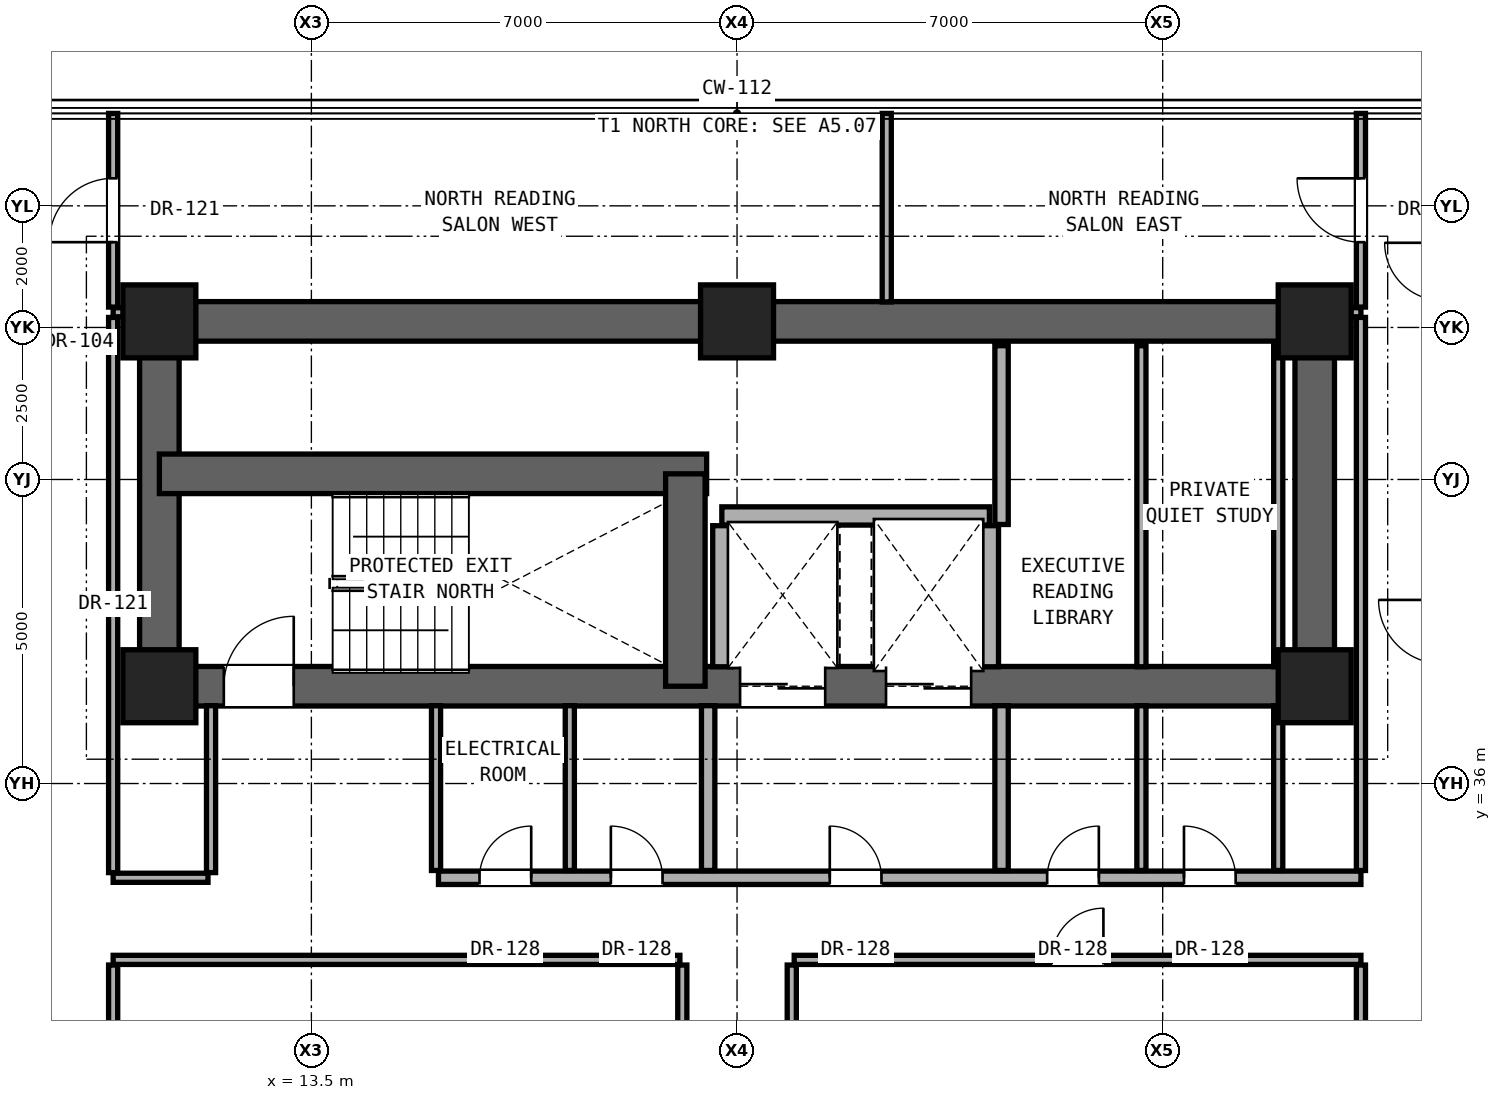
"""IFC4 building model, lengths in metres.
Left out: names, types, materials, properties, quantities, classifications, styles, units other than length and angle.
Written with IfcOpenShell. Run it as: python <this file> out.ifc"""

import sys

from ifc_helpers import new_model, si_unit, direction, frame, frame_2d, origin, origin_2d, place, context, subcontext, project, spatial, rectangle, extrude, element, fill, save


model = new_model("IFC4")
c1 = context("Model", 3, precision=1e-05, world=origin(), true_north=direction((0.0, 1.0)))
c2 = subcontext(c1, "Body", "Model", "MODEL_VIEW")
j1 = project(units=[si_unit("LENGTHUNIT", "METRE"), si_unit("PLANEANGLEUNIT", "RADIAN")], contexts=[c1])
p1 = place(None, origin())
s1 = spatial("IfcSite", under=j1, at=p1, CompositionType="ELEMENT")
p2 = place(p1, origin())
s2 = spatial("IfcBuilding", under=s1, at=p2, CompositionType="ELEMENT")
p3 = place(p2, frame((0.0, 0.0, 104.9)))
s3 = spatial("IfcBuildingStorey", under=s2, at=p3, CompositionType="ELEMENT", Elevation=104.9)
for number, where, z_axis, x_axis in (
    (1, (11.0, 37.6, 0.0), (0.0, 0.0, 1.0), (1.0, 0.0, 0.0)),
    (2, (30.0, 37.6, 0.0), (0.0, 0.0, 1.0), (1.0, 0.0, 0.0)),
    (3, (11.0, 43.6, 0.0), (0.0, 0.0, 1.0), (1.0, 0.0, 0.0)),
    (4, (20.5, 43.6, 0.0), (0.0, 0.0, 1.0), (1.0, 0.0, 0.0)),
    (5, (30.0, 43.6, 0.0), (0.0, 0.0, 1.0), (1.0, 0.0, 0.0)),
):
    element("IfcColumn", number, at=place(p3, frame(where, z_axis=z_axis, x_axis=x_axis)), inside=s3, PredefinedType="COLUMN", context=c2, shape_type="SweptSolid", body=[
        extrude(rectangle(XDim=1.2, YDim=1.2, at=origin_2d()), origin(), (0.0, 0.0, 1.0), 3.3),
    ])
p4 = place(p3, frame((11.0, 43.6, 0.0), z_axis=(0.0, 0.0, 1.0), x_axis=(1.0, 0.0, 0.0)))
e6 = element("IfcWall", 6, at=p4, inside=s3, PredefinedType="SHEAR", context=c2, shape_type="SweptSolid", body=[
    extrude(rectangle(XDim=19.0, YDim=0.65, at=frame_2d((9.5, 0.0))), origin(), (0.0, 0.0, 1.0), 3.08),
])
for number, where, z_axis, x_axis in (
    (7, (11.0, 37.6, 0.0), (0.0, 0.0, 1.0), (0.0, 1.0, 0.0)),
    (8, (30.0, 37.6, 0.0), (0.0, 0.0, 1.0), (0.0, 1.0, 0.0)),
):
    element("IfcWall", number, at=place(p3, frame(where, z_axis=z_axis, x_axis=x_axis)), inside=s3, PredefinedType="SHEAR", context=c2, shape_type="SweptSolid", body=[
        extrude(rectangle(XDim=6.0, YDim=0.65, at=frame_2d((3.0, 0.0))), origin(), (0.0, 0.0, 1.0), 3.08),
    ])
p5 = place(p3, frame((11.0, 37.6, 0.0), z_axis=(0.0, 0.0, 1.0), x_axis=(1.0, 0.0, 0.0)))
e9 = element("IfcWall", 9, at=p5, inside=s3, PredefinedType="SHEAR", context=c2, shape_type="SweptSolid", body=[
    extrude(rectangle(XDim=19.0, YDim=0.65, at=frame_2d((9.5, 0.0))), origin(), (0.0, 0.0, 1.0), 3.08),
])
p6 = place(p5, frame((1.06, 0.0, 0.0)))
e10 = element("IfcOpeningElement", 10, at=p6, cuts=e9, PredefinedType="OPENING", context=c2, shape_type="SweptSolid", body=[
    extrude(rectangle(XDim=1.15, YDim=2.2, at=frame_2d((0.575, 1.1))), frame((0.0, 0.335, 0.0), z_axis=(0.0, -1.0, 0.0), x_axis=(1.0, 0.0, 0.0)), (0.0, 0.0, 1.0), 0.67),
])
p7 = place(p5, frame((9.55, 0.0, 0.0)))
e11 = element("IfcOpeningElement", 11, at=p7, cuts=e9, PredefinedType="OPENING", context=c2, shape_type="SweptSolid", body=[
    extrude(rectangle(XDim=1.4, YDim=2.35, at=frame_2d((0.7, 1.175))), frame((0.0, 0.335, 0.0), z_axis=(0.0, -1.0, 0.0), x_axis=(1.0, 0.0, 0.0)), (0.0, 0.0, 1.0), 0.67),
])
p8 = place(p5, frame((11.95, 0.0, 0.0)))
e12 = element("IfcOpeningElement", 12, at=p8, cuts=e9, PredefinedType="OPENING", context=c2, shape_type="SweptSolid", body=[
    extrude(rectangle(XDim=1.4, YDim=2.35, at=frame_2d((0.7, 1.175))), frame((0.0, 0.335, 0.0), z_axis=(0.0, -1.0, 0.0), x_axis=(1.0, 0.0, 0.0)), (0.0, 0.0, 1.0), 0.67),
])
p9 = place(p3, frame((11.0, 41.093, 0.0), z_axis=(0.0, 0.0, 1.0), x_axis=(1.0, 0.0, 0.0)))
e13 = element("IfcWall", 13, at=p9, inside=s3, PredefinedType="SHEAR", context=c2, shape_type="SweptSolid", body=[
    extrude(rectangle(XDim=9.0, YDim=0.65, at=frame_2d((4.5, 0.0))), origin(), (0.0, 0.0, 1.0), 3.08),
])
p10 = place(p3, frame((19.65, 37.6, 0.0), z_axis=(0.0, 0.0, 1.0), x_axis=(0.0, 1.0, 0.0)))
e14 = element("IfcWall", 14, at=p10, inside=s3, PredefinedType="SHEAR", context=c2, shape_type="SweptSolid", body=[
    extrude(rectangle(XDim=3.493, YDim=0.65, at=frame_2d((1.747, 0.0))), origin(), (0.0, 0.0, 1.0), 3.08),
])
p11 = place(p3, frame((10.24, 33.1, 0.0), z_axis=(0.0, 0.0, 1.0), x_axis=(1.0, 0.0, 0.0)))
e15 = element("IfcWall", 15, at=p11, inside=s3, PredefinedType="PARTITIONING", context=c2, shape_type="SweptSolid", body=[
    extrude(rectangle(XDim=9.32, YDim=0.15, at=frame_2d((4.66, 0.0))), origin(), (0.0, 0.0, 1.0), 2.124),
])
p12 = place(p3, frame((21.44, 33.1, 0.0), z_axis=(0.0, 0.0, 1.0), x_axis=(1.0, 0.0, 0.0)))
e16 = element("IfcWall", 16, at=p12, inside=s3, PredefinedType="PARTITIONING", context=c2, shape_type="SweptSolid", body=[
    extrude(rectangle(XDim=9.32, YDim=0.15, at=frame_2d((4.66, 0.0))), origin(), (0.0, 0.0, 1.0), 2.124),
])
p13 = place(p12, frame((4.235, 0.0, 0.0)))
e17 = element("IfcOpeningElement", 17, at=p13, cuts=e16, PredefinedType="OPENING", context=c2, shape_type="SweptSolid", body=[
    extrude(rectangle(XDim=0.85, YDim=2.01, at=frame_2d((0.425, 1.005))), frame((0.0, 0.085, 0.0), z_axis=(0.0, -1.0, 0.0), x_axis=(1.0, 0.0, 0.0)), (0.0, 0.0, 1.0), 0.17),
])
p14 = place(p3, frame((10.24, 34.45, 0.0), z_axis=(0.0, 0.0, 1.0), x_axis=(1.0, 0.0, 0.0)))
e18 = element("IfcWall", 18, at=p14, inside=s3, PredefinedType="PARTITIONING", context=c2, shape_type="SweptSolid", body=[
    extrude(rectangle(XDim=1.56, YDim=0.15, at=frame_2d((0.78, 0.0))), origin(), (0.0, 0.0, 1.0), 2.124),
])
p15 = place(p3, frame((15.59, 34.45, 0.0), z_axis=(0.0, 0.0, 1.0), x_axis=(1.0, 0.0, 0.0)))
e19 = element("IfcWall", 19, at=p15, inside=s3, PredefinedType="SOLIDWALL", context=c2, shape_type="SweptSolid", body=[
    extrude(rectangle(XDim=15.17, YDim=0.22, at=frame_2d((7.585, 0.0))), origin(), (0.0, 0.0, 1.0), 2.124),
])
p16 = place(p15, frame((6.435, 0.0, 0.0)))
e20 = element("IfcOpeningElement", 20, at=p16, cuts=e19, PredefinedType="OPENING", context=c2, shape_type="SweptSolid", body=[
    extrude(rectangle(XDim=0.85, YDim=2.01, at=frame_2d((0.425, 1.005))), frame((0.0, 0.12, 0.0), z_axis=(0.0, -1.0, 0.0), x_axis=(1.0, 0.0, 0.0)), (0.0, 0.0, 1.0), 0.24),
])
p17 = place(p15, frame((10.01, 0.0, 0.0)))
e21 = element("IfcOpeningElement", 21, at=p17, cuts=e19, PredefinedType="OPENING", context=c2, shape_type="SweptSolid", body=[
    extrude(rectangle(XDim=0.85, YDim=2.01, at=frame_2d((0.425, 1.005))), frame((0.0, 0.12, 0.0), z_axis=(0.0, -1.0, 0.0), x_axis=(1.0, 0.0, 0.0)), (0.0, 0.0, 1.0), 0.24),
])
p18 = place(p15, frame((12.26, 0.0, 0.0)))
e22 = element("IfcOpeningElement", 22, at=p18, cuts=e19, PredefinedType="OPENING", context=c2, shape_type="SweptSolid", body=[
    extrude(rectangle(XDim=0.85, YDim=2.01, at=frame_2d((0.425, 1.005))), frame((0.0, 0.12, 0.0), z_axis=(0.0, -1.0, 0.0), x_axis=(1.0, 0.0, 0.0)), (0.0, 0.0, 1.0), 0.24),
])
p19 = place(p15, frame((0.675, 0.0, 0.0)))
e23 = element("IfcOpeningElement", 23, at=p19, cuts=e19, PredefinedType="OPENING", context=c2, shape_type="SweptSolid", body=[
    extrude(rectangle(XDim=0.85, YDim=2.01, at=frame_2d((0.425, 1.005))), frame((0.0, 0.12, 0.0), z_axis=(0.0, -1.0, 0.0), x_axis=(1.0, 0.0, 0.0)), (0.0, 0.0, 1.0), 0.24),
])
p20 = place(p15, frame((2.835, 0.0, 0.0)))
e24 = element("IfcOpeningElement", 24, at=p20, cuts=e19, PredefinedType="OPENING", context=c2, shape_type="SweptSolid", body=[
    extrude(rectangle(XDim=0.85, YDim=2.01, at=frame_2d((0.425, 1.005))), frame((0.0, 0.12, 0.0), z_axis=(0.0, -1.0, 0.0), x_axis=(1.0, 0.0, 0.0)), (0.0, 0.0, 1.0), 0.24),
])
p21 = place(p3, frame((20.25, 40.4, 0.0), z_axis=(0.0, 0.0, 1.0), x_axis=(1.0, 0.0, 0.0)))
e25 = element("IfcWall", 25, at=p21, inside=s3, PredefinedType="SOLIDWALL", context=c2, shape_type="SweptSolid", body=[
    extrude(rectangle(XDim=4.4, YDim=0.3, at=frame_2d((2.2, 0.0))), origin(), (0.0, 0.0, 1.0), 3.08),
])
for number, where, z_axis, x_axis in (
    (26, (10.24, 43.75, 0.0), (0.0, 0.0, 1.0), (1.0, 0.0, 0.0)),
    (27, (30.32, 43.75, 0.0), (0.0, 0.0, 1.0), (1.0, 0.0, 0.0)),
):
    element("IfcWall", number, at=place(p3, frame(where, z_axis=z_axis, x_axis=x_axis)), inside=s3, PredefinedType="PARTITIONING", context=c2, shape_type="SweptSolid", body=[
        extrude(rectangle(XDim=0.44, YDim=0.15, at=frame_2d((0.22, 0.0))), origin(), (0.0, 0.0, 1.0), 3.08),
    ])
p22 = place(p3, frame((10.24, 27.485, 0.0), z_axis=(0.0, 0.0, 1.0), x_axis=(0.0, 1.0, 0.0)))
e28 = element("IfcWall", 28, at=p22, inside=s3, PredefinedType="PARTITIONING", context=c2, shape_type="SweptSolid", body=[
    extrude(rectangle(XDim=5.53, YDim=0.15, at=frame_2d((2.765, 0.0))), origin(), (0.0, 0.0, 1.0), 2.299),
])
p23 = place(p22, frame((2.29, 0.0, 0.0)))
e29 = element("IfcOpeningElement", 29, at=p23, cuts=e28, PredefinedType="OPENING", context=c2, shape_type="SweptSolid", body=[
    extrude(rectangle(XDim=0.95, YDim=2.15, at=frame_2d((0.475, 1.075))), frame((0.0, 0.085, 0.0), z_axis=(0.0, -1.0, 0.0), x_axis=(1.0, 0.0, 0.0)), (0.0, 0.0, 1.0), 0.17),
])
p24 = place(p3, frame((10.24, 34.535, 0.0), z_axis=(0.0, 0.0, 1.0), x_axis=(0.0, 1.0, 0.0)))
e30 = element("IfcWall", 30, at=p24, inside=s3, PredefinedType="PARTITIONING", context=c2, shape_type="SweptSolid", body=[
    extrude(rectangle(XDim=9.13, YDim=0.15, at=frame_2d((4.565, 0.0))), origin(), (0.0, 0.0, 1.0), 2.456),
])
p25 = place(p3, frame((10.24, 43.835, 0.0), z_axis=(0.0, 0.0, 1.0), x_axis=(0.0, 1.0, 0.0)))
e31 = element("IfcWall", 31, at=p25, inside=s3, PredefinedType="PARTITIONING", context=c2, shape_type="SweptSolid", body=[
    extrude(rectangle(XDim=3.185, YDim=0.15, at=frame_2d((1.593, 0.0))), origin(), (0.0, 0.0, 1.0), 3.08),
])
p26 = place(p25, frame((1.067, 0.0, 0.0)))
e32 = element("IfcOpeningElement", 32, at=p26, cuts=e31, PredefinedType="OPENING", context=c2, shape_type="SweptSolid", body=[
    extrude(rectangle(XDim=1.05, YDim=2.2, at=frame_2d((0.525, 1.1))), frame((0.0, 0.085, 0.0), z_axis=(0.0, -1.0, 0.0), x_axis=(1.0, 0.0, 0.0)), (0.0, 0.0, 1.0), 0.17),
])
p27 = place(p3, frame((11.85, 34.535, 0.0), z_axis=(0.0, 0.0, 1.0), x_axis=(0.0, 1.0, 0.0)))
e33 = element("IfcWall", 33, at=p27, inside=s3, PredefinedType="PARTITIONING", context=c2, shape_type="SweptSolid", body=[
    extrude(rectangle(XDim=2.745, YDim=0.15, at=frame_2d((1.373, 0.0))), origin(), (0.0, 0.0, 1.0), 3.08),
])
p28 = place(p3, frame((15.55, 34.57, 0.0), z_axis=(0.0, 0.0, 1.0), x_axis=(0.0, 1.0, 0.0)))
e34 = element("IfcWall", 34, at=p28, inside=s3, PredefinedType="PARTITIONING", context=c2, shape_type="SweptSolid", body=[
    extrude(rectangle(XDim=2.71, YDim=0.15, at=frame_2d((1.355, 0.0))), origin(), (0.0, 0.0, 1.0), 2.609),
])
p29 = place(p3, frame((17.75, 34.57, 0.0), z_axis=(0.0, 0.0, 1.0), x_axis=(0.0, 1.0, 0.0)))
e35 = element("IfcWall", 35, at=p29, inside=s3, PredefinedType="PARTITIONING", context=c2, shape_type="SweptSolid", body=[
    extrude(rectangle(XDim=2.71, YDim=0.15, at=frame_2d((1.355, 0.0))), origin(), (0.0, 0.0, 1.0), 3.08),
])
p30 = place(p3, frame((19.6, 27.485, 0.0), z_axis=(0.0, 0.0, 1.0), x_axis=(0.0, 1.0, 0.0)))
e36 = element("IfcWall", 36, at=p30, inside=s3, PredefinedType="PARTITIONING", context=c2, shape_type="SweptSolid", body=[
    extrude(rectangle(XDim=5.53, YDim=0.15, at=frame_2d((2.765, 0.0))), origin(), (0.0, 0.0, 1.0), 2.124),
])
p31 = place(p3, frame((20.025, 34.57, 0.0), z_axis=(0.0, 0.0, 1.0), x_axis=(0.0, 1.0, 0.0)))
e37 = element("IfcWall", 37, at=p31, inside=s3, PredefinedType="SOLIDWALL", context=c2, shape_type="SweptSolid", body=[
    extrude(rectangle(XDim=2.71, YDim=0.22, at=frame_2d((1.355, 0.0))), origin(), (0.0, 0.0, 1.0), 3.08),
])
p32 = place(p3, frame((20.25, 37.92, 0.0), z_axis=(0.0, 0.0, 1.0), x_axis=(0.0, 1.0, 0.0)))
e38 = element("IfcWall", 38, at=p32, inside=s3, PredefinedType="SOLIDWALL", context=c2, shape_type="SweptSolid", body=[
    extrude(rectangle(XDim=2.32, YDim=0.3, at=frame_2d((1.16, 0.0))), origin(), (0.0, 0.0, 1.0), 3.08),
])
p33 = place(p3, frame((21.4, 27.485, 0.0), z_axis=(0.0, 0.0, 1.0), x_axis=(0.0, 1.0, 0.0)))
e39 = element("IfcWall", 39, at=p33, inside=s3, PredefinedType="PARTITIONING", context=c2, shape_type="SweptSolid", body=[
    extrude(rectangle(XDim=5.53, YDim=0.15, at=frame_2d((2.765, 0.0))), origin(), (0.0, 0.0, 1.0), 2.124),
])
p34 = place(p3, frame((22.962, 43.92, 0.0), z_axis=(0.0, 0.0, 1.0), x_axis=(0.0, 1.0, 0.0)))
e40 = element("IfcWall", 40, at=p34, inside=s3, PredefinedType="PARTITIONING", context=c2, shape_type="SweptSolid", body=[
    extrude(rectangle(XDim=3.1, YDim=0.15, at=frame_2d((1.55, 0.0))), origin(), (0.0, 0.0, 1.0), 3.08),
])
p35 = place(p3, frame((24.65, 37.92, 0.0), z_axis=(0.0, 0.0, 1.0), x_axis=(0.0, 1.0, 0.0)))
e41 = element("IfcWall", 41, at=p35, inside=s3, PredefinedType="SOLIDWALL", context=c2, shape_type="SweptSolid", body=[
    extrude(rectangle(XDim=2.32, YDim=0.3, at=frame_2d((1.16, 0.0))), origin(), (0.0, 0.0, 1.0), 3.08),
])
p36 = place(p3, frame((24.85, 34.57, 0.0), z_axis=(0.0, 0.0, 1.0), x_axis=(0.0, 1.0, 0.0)))
e42 = element("IfcWall", 42, at=p36, inside=s3, PredefinedType="SOLIDWALL", context=c2, shape_type="SweptSolid", body=[
    extrude(rectangle(XDim=2.71, YDim=0.22, at=frame_2d((1.355, 0.0))), origin(), (0.0, 0.0, 1.0), 3.08),
])
p37 = place(p3, frame((24.85, 40.26, 0.0), z_axis=(0.0, 0.0, 1.0), x_axis=(0.0, 1.0, 0.0)))
e43 = element("IfcWall", 43, at=p37, inside=s3, PredefinedType="SOLIDWALL", context=c2, shape_type="SweptSolid", body=[
    extrude(rectangle(XDim=2.94, YDim=0.22, at=frame_2d((1.47, 0.0))), origin(), (0.0, 0.0, 1.0), 3.08),
])
p38 = place(p3, frame((27.15, 34.57, 0.0), z_axis=(0.0, 0.0, 1.0), x_axis=(0.0, 1.0, 0.0)))
e44 = element("IfcWall", 44, at=p38, inside=s3, PredefinedType="PARTITIONING", context=c2, shape_type="SweptSolid", body=[
    extrude(rectangle(XDim=2.71, YDim=0.15, at=frame_2d((1.355, 0.0))), origin(), (0.0, 0.0, 1.0), 3.08),
])
p39 = place(p3, frame((27.15, 37.92, 0.0), z_axis=(0.0, 0.0, 1.0), x_axis=(0.0, 1.0, 0.0)))
e45 = element("IfcWall", 45, at=p39, inside=s3, PredefinedType="PARTITIONING", context=c2, shape_type="SweptSolid", body=[
    extrude(rectangle(XDim=5.28, YDim=0.15, at=frame_2d((2.64, 0.0))), origin(), (0.0, 0.0, 1.0), 3.08),
])
p40 = place(p3, frame((29.4, 34.57, 0.0), z_axis=(0.0, 0.0, 1.0), x_axis=(0.0, 1.0, 0.0)))
e46 = element("IfcWall", 46, at=p40, inside=s3, PredefinedType="PARTITIONING", context=c2, shape_type="SweptSolid", body=[
    extrude(rectangle(XDim=2.71, YDim=0.15, at=frame_2d((1.355, 0.0))), origin(), (0.0, 0.0, 1.0), 3.08),
])
p41 = place(p3, frame((29.4, 37.92, 0.0), z_axis=(0.0, 0.0, 1.0), x_axis=(0.0, 1.0, 0.0)))
e47 = element("IfcWall", 47, at=p41, inside=s3, PredefinedType="PARTITIONING", context=c2, shape_type="SweptSolid", body=[
    extrude(rectangle(XDim=5.28, YDim=0.15, at=frame_2d((2.64, 0.0))), origin(), (0.0, 0.0, 1.0), 3.08),
])
p42 = place(p3, frame((30.76, 27.485, 0.0), z_axis=(0.0, 0.0, 1.0), x_axis=(0.0, 1.0, 0.0)))
e48 = element("IfcWall", 48, at=p42, inside=s3, PredefinedType="PARTITIONING", context=c2, shape_type="SweptSolid", body=[
    extrude(rectangle(XDim=5.53, YDim=0.15, at=frame_2d((2.765, 0.0))), origin(), (0.0, 0.0, 1.0), 2.299),
])
p43 = place(p3, frame((30.76, 34.57, 0.0), z_axis=(0.0, 0.0, 1.0), x_axis=(0.0, 1.0, 0.0)))
e49 = element("IfcWall", 49, at=p43, inside=s3, PredefinedType="PARTITIONING", context=c2, shape_type="SweptSolid", body=[
    extrude(rectangle(XDim=9.095, YDim=0.15, at=frame_2d((4.547, 0.0))), origin(), (0.0, 0.0, 1.0), 2.456),
])
p44 = place(p3, frame((30.76, 43.835, 0.0), z_axis=(0.0, 0.0, 1.0), x_axis=(0.0, 1.0, 0.0)))
e50 = element("IfcWall", 50, at=p44, inside=s3, PredefinedType="PARTITIONING", context=c2, shape_type="SweptSolid", body=[
    extrude(rectangle(XDim=3.185, YDim=0.15, at=frame_2d((1.593, 0.0))), origin(), (0.0, 0.0, 1.0), 3.08),
])
p45 = place(p44, frame((1.067, 0.0, 0.0)))
e51 = element("IfcOpeningElement", 51, at=p45, cuts=e50, PredefinedType="OPENING", context=c2, shape_type="SweptSolid", body=[
    extrude(rectangle(XDim=1.05, YDim=2.2, at=frame_2d((0.525, 1.1))), frame((0.0, 0.085, 0.0), z_axis=(0.0, -1.0, 0.0), x_axis=(1.0, 0.0, 0.0)), (0.0, 0.0, 1.0), 0.17),
])
p46 = place(p6, origin())
e52 = element("IfcDoor", 52, at=p46, inside=s3, OperationType="SINGLE_SWING_RIGHT", PredefinedType="DOOR", context=c2, shape_type="SweptSolid", body=[
    extrude(rectangle(XDim=1.15, YDim=2.2, at=frame_2d((0.575, 1.1))), frame((0.0, 0.025, 0.0), z_axis=(0.0, -1.0, 0.0), x_axis=(1.0, 0.0, 0.0)), (0.0, 0.0, 1.0), 0.05),
])
fill(e10, e52)
p47 = place(p16, origin())
e53 = element("IfcDoor", 53, at=p47, inside=s3, OperationType="SINGLE_SWING_LEFT", PredefinedType="DOOR", context=c2, shape_type="SweptSolid", body=[
    extrude(rectangle(XDim=0.85, YDim=2.01, at=frame_2d((0.425, 1.005))), frame((0.0, 0.025, 0.0), z_axis=(0.0, -1.0, 0.0), x_axis=(1.0, 0.0, 0.0)), (0.0, 0.0, 1.0), 0.05),
])
fill(e20, e53)
p48 = place(p17, origin())
e54 = element("IfcDoor", 54, at=p48, inside=s3, OperationType="SINGLE_SWING_RIGHT", PredefinedType="DOOR", context=c2, shape_type="SweptSolid", body=[
    extrude(rectangle(XDim=0.85, YDim=2.01, at=frame_2d((0.425, 1.005))), frame((0.0, 0.025, 0.0), z_axis=(0.0, -1.0, 0.0), x_axis=(1.0, 0.0, 0.0)), (0.0, 0.0, 1.0), 0.05),
])
fill(e21, e54)
p49 = place(p18, origin())
e55 = element("IfcDoor", 55, at=p49, inside=s3, OperationType="SINGLE_SWING_LEFT", PredefinedType="DOOR", context=c2, shape_type="SweptSolid", body=[
    extrude(rectangle(XDim=0.85, YDim=2.01, at=frame_2d((0.425, 1.005))), frame((0.0, 0.025, 0.0), z_axis=(0.0, -1.0, 0.0), x_axis=(1.0, 0.0, 0.0)), (0.0, 0.0, 1.0), 0.05),
])
fill(e22, e55)
p50 = place(p19, origin())
e56 = element("IfcDoor", 56, at=p50, inside=s3, OperationType="SINGLE_SWING_RIGHT", PredefinedType="DOOR", context=c2, shape_type="SweptSolid", body=[
    extrude(rectangle(XDim=0.85, YDim=2.01, at=frame_2d((0.425, 1.005))), frame((0.0, 0.025, 0.0), z_axis=(0.0, -1.0, 0.0), x_axis=(1.0, 0.0, 0.0)), (0.0, 0.0, 1.0), 0.05),
])
fill(e23, e56)
p51 = place(p20, origin())
e57 = element("IfcDoor", 57, at=p51, inside=s3, OperationType="SINGLE_SWING_LEFT", PredefinedType="DOOR", context=c2, shape_type="SweptSolid", body=[
    extrude(rectangle(XDim=0.85, YDim=2.01, at=frame_2d((0.425, 1.005))), frame((0.0, 0.025, 0.0), z_axis=(0.0, -1.0, 0.0), x_axis=(1.0, 0.0, 0.0)), (0.0, 0.0, 1.0), 0.05),
])
fill(e24, e57)
p52 = place(p13, origin())
e58 = element("IfcDoor", 58, at=p52, inside=s3, OperationType="SINGLE_SWING_RIGHT", PredefinedType="DOOR", context=c2, shape_type="SweptSolid", body=[
    extrude(rectangle(XDim=0.85, YDim=2.01, at=frame_2d((0.425, 1.005))), frame((0.0, 0.025, 0.0), z_axis=(0.0, -1.0, 0.0), x_axis=(1.0, 0.0, 0.0)), (0.0, 0.0, 1.0), 0.05),
])
fill(e17, e58)
p53 = place(p26, origin())
e59 = element("IfcDoor", 59, at=p53, inside=s3, OperationType="SINGLE_SWING_LEFT", PredefinedType="DOOR", context=c2, shape_type="SweptSolid", body=[
    extrude(rectangle(XDim=1.05, YDim=2.2, at=frame_2d((0.525, 1.1))), frame((0.0, 0.025, 0.0), z_axis=(0.0, -1.0, 0.0), x_axis=(1.0, 0.0, 0.0)), (0.0, 0.0, 1.0), 0.05),
])
fill(e32, e59)
p54 = place(p45, origin())
e60 = element("IfcDoor", 60, at=p54, inside=s3, OperationType="SINGLE_SWING_RIGHT", PredefinedType="DOOR", context=c2, shape_type="SweptSolid", body=[
    extrude(rectangle(XDim=1.05, YDim=2.2, at=frame_2d((0.525, 1.1))), frame((0.0, 0.025, 0.0), z_axis=(0.0, -1.0, 0.0), x_axis=(1.0, 0.0, 0.0)), (0.0, 0.0, 1.0), 0.05),
])
fill(e51, e60)
p55 = place(p7, origin())
e61 = element("IfcDoor", 61, at=p55, inside=s3, OperationType="DOUBLE_DOOR_SLIDING", PredefinedType="DOOR", context=c2, shape_type="SweptSolid", body=[
    extrude(rectangle(XDim=1.4, YDim=2.35, at=frame_2d((0.7, 1.175))), frame((0.0, 0.025, 0.0), z_axis=(0.0, -1.0, 0.0), x_axis=(1.0, 0.0, 0.0)), (0.0, 0.0, 1.0), 0.05),
])
fill(e11, e61)
p56 = place(p8, origin())
e62 = element("IfcDoor", 62, at=p56, inside=s3, OperationType="DOUBLE_DOOR_SLIDING", PredefinedType="DOOR", context=c2, shape_type="SweptSolid", body=[
    extrude(rectangle(XDim=1.4, YDim=2.35, at=frame_2d((0.7, 1.175))), frame((0.0, 0.025, 0.0), z_axis=(0.0, -1.0, 0.0), x_axis=(1.0, 0.0, 0.0)), (0.0, 0.0, 1.0), 0.05),
])
fill(e12, e62)
save(model, sys.argv[1])
